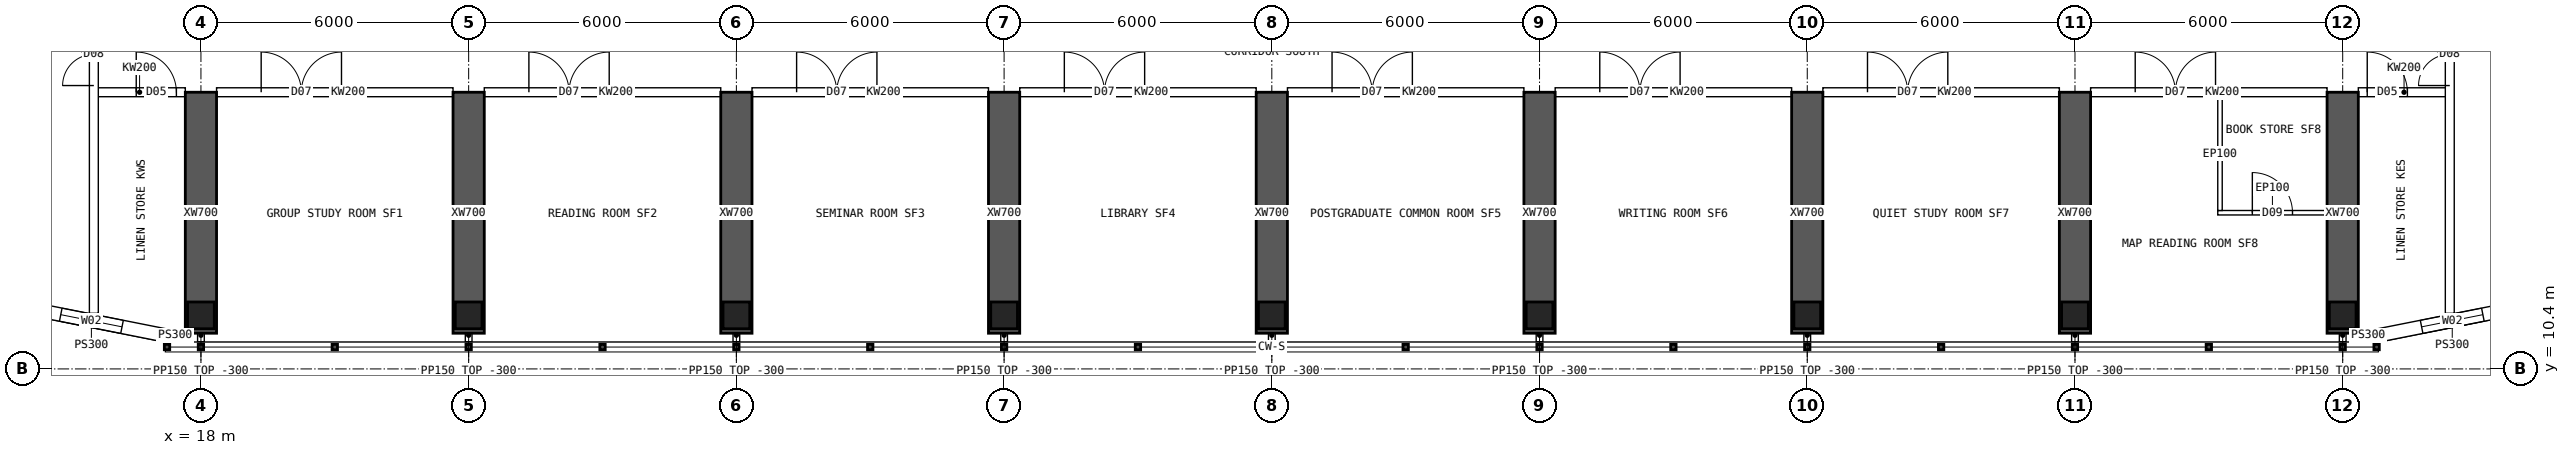
"""IFC4 building model, lengths in metres.
Left out: names, types, materials, properties, quantities, classifications, styles, units other than length and angle.
Written with IfcOpenShell. Run it as: python <this file> out.ifc"""

import sys

from ifc_helpers import new_model, si_unit, direction, frame, frame_2d, origin, origin_2d, place, context, subcontext, project, spatial, polyline, rectangle, hollow_rectangle, outline, extrude, element, fill, save


model = new_model("IFC4")
c1 = context("Model", 3, precision=1e-05, world=origin(), true_north=direction((0.0, 1.0)))
c2 = subcontext(c1, "Body", "Model", "MODEL_VIEW")
j1 = project(units=[si_unit("LENGTHUNIT", "METRE"), si_unit("PLANEANGLEUNIT", "RADIAN")], contexts=[c1])
p1 = place(None, origin())
s1 = spatial("IfcSite", under=j1, at=p1, CompositionType="ELEMENT")
p2 = place(p1, origin())
s2 = spatial("IfcBuilding", under=s1, at=p2, CompositionType="ELEMENT")
p3 = place(p2, frame((0.0, 0.0, 257.8)))
s3 = spatial("IfcBuildingStorey", under=s2, at=p3, CompositionType="ELEMENT", Elevation=257.8)
for number, where, z_axis, x_axis in (
    (1, (18.0, 11.6, 0.0), (0.0, 0.0, 1.0), (1.0, 0.0, 0.0)),
    (2, (24.0, 11.6, 0.0), (0.0, 0.0, 1.0), (1.0, 0.0, 0.0)),
    (3, (30.0, 11.6, 0.0), (0.0, 0.0, 1.0), (1.0, 0.0, 0.0)),
    (4, (36.0, 11.6, 0.0), (0.0, 0.0, 1.0), (1.0, 0.0, 0.0)),
    (5, (42.0, 11.6, 0.0), (0.0, 0.0, 1.0), (1.0, 0.0, 0.0)),
    (6, (48.0, 11.6, 0.0), (0.0, 0.0, 1.0), (1.0, 0.0, 0.0)),
    (7, (54.0, 11.6, 0.0), (0.0, 0.0, 1.0), (1.0, 0.0, 0.0)),
    (8, (60.0, 11.6, 0.0), (0.0, 0.0, 1.0), (1.0, 0.0, 0.0)),
    (9, (66.0, 11.6, 0.0), (0.0, 0.0, 1.0), (1.0, 0.0, 0.0)),
):
    element("IfcColumn", number, at=place(p3, frame(where, z_axis=z_axis, x_axis=x_axis)), inside=s3, PredefinedType="COLUMN", context=c2, shape_type="SweptSolid", body=[
        extrude(hollow_rectangle(XDim=0.6, YDim=0.6, WallThickness=0.06, at=origin_2d()), origin(), (0.0, 0.0, 1.0), 4.5),
    ])
for number, where, z_axis, x_axis in (
    (10, (18.0, 11.2, 0.0), (0.0, 0.0, 1.0), (0.0, 1.0, 0.0)),
    (11, (24.0, 11.2, 0.0), (0.0, 0.0, 1.0), (0.0, 1.0, 0.0)),
    (12, (30.0, 11.2, 0.0), (0.0, 0.0, 1.0), (0.0, 1.0, 0.0)),
    (13, (36.0, 11.2, 0.0), (0.0, 0.0, 1.0), (0.0, 1.0, 0.0)),
    (14, (42.0, 11.2, 0.0), (0.0, 0.0, 1.0), (0.0, 1.0, 0.0)),
    (15, (48.0, 11.2, 0.0), (0.0, 0.0, 1.0), (0.0, 1.0, 0.0)),
    (16, (54.0, 11.2, 0.0), (0.0, 0.0, 1.0), (0.0, 1.0, 0.0)),
    (17, (60.0, 11.2, 0.0), (0.0, 0.0, 1.0), (0.0, 1.0, 0.0)),
    (18, (66.0, 11.2, 0.0), (0.0, 0.0, 1.0), (0.0, 1.0, 0.0)),
):
    element("IfcWall", number, at=place(p3, frame(where, z_axis=z_axis, x_axis=x_axis)), inside=s3, PredefinedType="SHEAR", context=c2, shape_type="SweptSolid", body=[
        extrude(rectangle(XDim=5.4, YDim=0.7, at=frame_2d((2.7, 0.0))), origin(), (0.0, 0.0, 1.0), 4.5),
    ])
p4 = place(p3, frame((66.8, 11.15, 0.0), z_axis=(0.0, 0.0, 1.0), x_axis=(0.98078325777, 0.195100490205, 0.0)))
e19 = element("IfcWall", 19, at=p4, inside=s3, PredefinedType="SOLIDWALL", context=c2, shape_type="SweptSolid", body=[
    extrude(outline(polyline([(-0.03, -0.15), (3.405, -0.15), (3.345, 0.15), (0.03, 0.15), (-0.03, -0.15)])), origin(), (0.0, 0.0, 1.0), 4.2),
])
p5 = place(p4, frame((0.988, 0.0, 0.9)))
e20 = element("IfcOpeningElement", 20, at=p5, cuts=e19, PredefinedType="OPENING", context=c2, shape_type="SweptSolid", body=[
    extrude(rectangle(XDim=1.4, YDim=1.8, at=frame_2d((0.7, 0.9))), frame((0.0, 0.16, 0.0), z_axis=(0.0, -1.0, 0.0), x_axis=(1.0, 0.0, 0.0)), (0.0, 0.0, 1.0), 0.32),
])
p6 = place(p3, frame((13.89, 11.808, 0.0), z_axis=(0.0, 0.0, 1.0), x_axis=(0.98078325777, -0.195100490205, 0.0)))
e21 = element("IfcWall", 21, at=p6, inside=s3, PredefinedType="SOLIDWALL", context=c2, shape_type="SweptSolid", body=[
    extrude(outline(polyline([(-0.03, -0.15), (3.405, -0.15), (3.345, 0.15), (0.03, 0.15), (-0.03, -0.15)])), origin(), (0.0, 0.0, 1.0), 4.2),
])
p7 = place(p6, frame((0.988, 0.0, 0.9)))
e22 = element("IfcOpeningElement", 22, at=p7, cuts=e21, PredefinedType="OPENING", context=c2, shape_type="SweptSolid", body=[
    extrude(rectangle(XDim=1.4, YDim=1.8, at=frame_2d((0.7, 0.9))), frame((0.0, 0.16, 0.0), z_axis=(0.0, -1.0, 0.0), x_axis=(1.0, 0.0, 0.0)), (0.0, 0.0, 1.0), 0.32),
])
for number, where, z_axis, x_axis in (
    (23, (66.8, 11.15, 0.0), (0.0, 0.0, 1.0), (-1.0, 0.0, 0.0)),
    (24, (17.2, 11.15, 0.0), (0.0, 0.0, 1.0), (1.0, 0.0, 0.0)),
):
    element("IfcWall", number, at=place(p3, frame(where, z_axis=z_axis, x_axis=x_axis)), inside=s3, PredefinedType="SOLIDWALL", context=c2, shape_type="SweptSolid", body=[
        extrude(rectangle(XDim=0.45, YDim=0.3, at=frame_2d((0.225, 0.0))), origin(), (0.0, 0.0, 1.0), 4.2),
    ])
p8 = place(p3, frame((15.6, 16.6, 0.0), z_axis=(0.0, 0.0, 1.0), x_axis=(1.0, 0.0, 0.0)))
e25 = element("IfcWall", 25, at=p8, inside=s3, PredefinedType="SOLIDWALL", context=c2, shape_type="SweptSolid", body=[
    extrude(rectangle(XDim=2.05, YDim=0.2, at=frame_2d((1.025, 0.0))), origin(), (0.0, 0.0, 1.0), 4.2),
])
p9 = place(p8, frame((0.95, 0.0, 0.0)))
e26 = element("IfcOpeningElement", 26, at=p9, cuts=e25, PredefinedType="OPENING", context=c2, shape_type="SweptSolid", body=[
    extrude(rectangle(XDim=0.9, YDim=2.1, at=frame_2d((0.45, 1.05))), frame((0.0, 0.11, 0.0), z_axis=(0.0, -1.0, 0.0), x_axis=(1.0, 0.0, 0.0)), (0.0, 0.0, 1.0), 0.22),
])
p10 = place(p3, frame((18.35, 16.6, 0.0), z_axis=(0.0, 0.0, 1.0), x_axis=(1.0, 0.0, 0.0)))
e27 = element("IfcWall", 27, at=p10, inside=s3, PredefinedType="SOLIDWALL", context=c2, shape_type="SweptSolid", body=[
    extrude(rectangle(XDim=5.3, YDim=0.2, at=frame_2d((2.65, 0.0))), origin(), (0.0, 0.0, 1.0), 4.2),
])
p11 = place(p10, frame((1.0, 0.0, 0.0)))
e28 = element("IfcOpeningElement", 28, at=p11, cuts=e27, PredefinedType="OPENING", context=c2, shape_type="SweptSolid", body=[
    extrude(rectangle(XDim=1.8, YDim=2.1, at=frame_2d((0.9, 1.05))), frame((0.0, 0.11, 0.0), z_axis=(0.0, -1.0, 0.0), x_axis=(1.0, 0.0, 0.0)), (0.0, 0.0, 1.0), 0.22),
])
p12 = place(p3, frame((24.35, 16.6, 0.0), z_axis=(0.0, 0.0, 1.0), x_axis=(1.0, 0.0, 0.0)))
e29 = element("IfcWall", 29, at=p12, inside=s3, PredefinedType="SOLIDWALL", context=c2, shape_type="SweptSolid", body=[
    extrude(rectangle(XDim=5.3, YDim=0.2, at=frame_2d((2.65, 0.0))), origin(), (0.0, 0.0, 1.0), 4.2),
])
p13 = place(p12, frame((1.0, 0.0, 0.0)))
e30 = element("IfcOpeningElement", 30, at=p13, cuts=e29, PredefinedType="OPENING", context=c2, shape_type="SweptSolid", body=[
    extrude(rectangle(XDim=1.8, YDim=2.1, at=frame_2d((0.9, 1.05))), frame((0.0, 0.11, 0.0), z_axis=(0.0, -1.0, 0.0), x_axis=(1.0, 0.0, 0.0)), (0.0, 0.0, 1.0), 0.22),
])
p14 = place(p3, frame((30.35, 16.6, 0.0), z_axis=(0.0, 0.0, 1.0), x_axis=(1.0, 0.0, 0.0)))
e31 = element("IfcWall", 31, at=p14, inside=s3, PredefinedType="SOLIDWALL", context=c2, shape_type="SweptSolid", body=[
    extrude(rectangle(XDim=5.3, YDim=0.2, at=frame_2d((2.65, 0.0))), origin(), (0.0, 0.0, 1.0), 4.2),
])
p15 = place(p14, frame((1.0, 0.0, 0.0)))
e32 = element("IfcOpeningElement", 32, at=p15, cuts=e31, PredefinedType="OPENING", context=c2, shape_type="SweptSolid", body=[
    extrude(rectangle(XDim=1.8, YDim=2.1, at=frame_2d((0.9, 1.05))), frame((0.0, 0.11, 0.0), z_axis=(0.0, -1.0, 0.0), x_axis=(1.0, 0.0, 0.0)), (0.0, 0.0, 1.0), 0.22),
])
p16 = place(p3, frame((36.35, 16.6, 0.0), z_axis=(0.0, 0.0, 1.0), x_axis=(1.0, 0.0, 0.0)))
e33 = element("IfcWall", 33, at=p16, inside=s3, PredefinedType="SOLIDWALL", context=c2, shape_type="SweptSolid", body=[
    extrude(rectangle(XDim=5.3, YDim=0.2, at=frame_2d((2.65, 0.0))), origin(), (0.0, 0.0, 1.0), 4.2),
])
p17 = place(p16, frame((1.0, 0.0, 0.0)))
e34 = element("IfcOpeningElement", 34, at=p17, cuts=e33, PredefinedType="OPENING", context=c2, shape_type="SweptSolid", body=[
    extrude(rectangle(XDim=1.8, YDim=2.1, at=frame_2d((0.9, 1.05))), frame((0.0, 0.11, 0.0), z_axis=(0.0, -1.0, 0.0), x_axis=(1.0, 0.0, 0.0)), (0.0, 0.0, 1.0), 0.22),
])
p18 = place(p3, frame((42.35, 16.6, 0.0), z_axis=(0.0, 0.0, 1.0), x_axis=(1.0, 0.0, 0.0)))
e35 = element("IfcWall", 35, at=p18, inside=s3, PredefinedType="SOLIDWALL", context=c2, shape_type="SweptSolid", body=[
    extrude(rectangle(XDim=5.3, YDim=0.2, at=frame_2d((2.65, 0.0))), origin(), (0.0, 0.0, 1.0), 4.2),
])
p19 = place(p18, frame((1.0, 0.0, 0.0)))
e36 = element("IfcOpeningElement", 36, at=p19, cuts=e35, PredefinedType="OPENING", context=c2, shape_type="SweptSolid", body=[
    extrude(rectangle(XDim=1.8, YDim=2.1, at=frame_2d((0.9, 1.05))), frame((0.0, 0.11, 0.0), z_axis=(0.0, -1.0, 0.0), x_axis=(1.0, 0.0, 0.0)), (0.0, 0.0, 1.0), 0.22),
])
p20 = place(p3, frame((48.35, 16.6, 0.0), z_axis=(0.0, 0.0, 1.0), x_axis=(1.0, 0.0, 0.0)))
e37 = element("IfcWall", 37, at=p20, inside=s3, PredefinedType="SOLIDWALL", context=c2, shape_type="SweptSolid", body=[
    extrude(rectangle(XDim=5.3, YDim=0.2, at=frame_2d((2.65, 0.0))), origin(), (0.0, 0.0, 1.0), 4.2),
])
p21 = place(p20, frame((1.0, 0.0, 0.0)))
e38 = element("IfcOpeningElement", 38, at=p21, cuts=e37, PredefinedType="OPENING", context=c2, shape_type="SweptSolid", body=[
    extrude(rectangle(XDim=1.8, YDim=2.1, at=frame_2d((0.9, 1.05))), frame((0.0, 0.11, 0.0), z_axis=(0.0, -1.0, 0.0), x_axis=(1.0, 0.0, 0.0)), (0.0, 0.0, 1.0), 0.22),
])
p22 = place(p3, frame((54.35, 16.6, 0.0), z_axis=(0.0, 0.0, 1.0), x_axis=(1.0, 0.0, 0.0)))
e39 = element("IfcWall", 39, at=p22, inside=s3, PredefinedType="SOLIDWALL", context=c2, shape_type="SweptSolid", body=[
    extrude(rectangle(XDim=5.3, YDim=0.2, at=frame_2d((2.65, 0.0))), origin(), (0.0, 0.0, 1.0), 4.2),
])
p23 = place(p22, frame((1.0, 0.0, 0.0)))
e40 = element("IfcOpeningElement", 40, at=p23, cuts=e39, PredefinedType="OPENING", context=c2, shape_type="SweptSolid", body=[
    extrude(rectangle(XDim=1.8, YDim=2.1, at=frame_2d((0.9, 1.05))), frame((0.0, 0.11, 0.0), z_axis=(0.0, -1.0, 0.0), x_axis=(1.0, 0.0, 0.0)), (0.0, 0.0, 1.0), 0.22),
])
p24 = place(p3, frame((60.35, 16.6, 0.0), z_axis=(0.0, 0.0, 1.0), x_axis=(1.0, 0.0, 0.0)))
e41 = element("IfcWall", 41, at=p24, inside=s3, PredefinedType="SOLIDWALL", context=c2, shape_type="SweptSolid", body=[
    extrude(rectangle(XDim=5.3, YDim=0.2, at=frame_2d((2.65, 0.0))), origin(), (0.0, 0.0, 1.0), 4.2),
])
p25 = place(p24, frame((1.0, 0.0, 0.0)))
e42 = element("IfcOpeningElement", 42, at=p25, cuts=e41, PredefinedType="OPENING", context=c2, shape_type="SweptSolid", body=[
    extrude(rectangle(XDim=1.8, YDim=2.1, at=frame_2d((0.9, 1.05))), frame((0.0, 0.11, 0.0), z_axis=(0.0, -1.0, 0.0), x_axis=(1.0, 0.0, 0.0)), (0.0, 0.0, 1.0), 0.22),
])
p26 = place(p3, frame((66.35, 16.6, 0.0), z_axis=(0.0, 0.0, 1.0), x_axis=(1.0, 0.0, 0.0)))
e43 = element("IfcWall", 43, at=p26, inside=s3, PredefinedType="SOLIDWALL", context=c2, shape_type="SweptSolid", body=[
    extrude(rectangle(XDim=2.05, YDim=0.2, at=frame_2d((1.025, 0.0))), origin(), (0.0, 0.0, 1.0), 4.2),
])
p27 = place(p26, frame((0.2, 0.0, 0.0)))
e44 = element("IfcOpeningElement", 44, at=p27, cuts=e43, PredefinedType="OPENING", context=c2, shape_type="SweptSolid", body=[
    extrude(rectangle(XDim=0.9, YDim=2.1, at=frame_2d((0.45, 1.05))), frame((0.0, 0.11, 0.0), z_axis=(0.0, -1.0, 0.0), x_axis=(1.0, 0.0, 0.0)), (0.0, 0.0, 1.0), 0.22),
])
p28 = place(p3, frame((65.65, 13.9, 0.0), z_axis=(0.0, 0.0, 1.0), x_axis=(-1.0, 0.0, 0.0)))
e45 = element("IfcWall", 45, at=p28, inside=s3, PredefinedType="PARTITIONING", context=c2, shape_type="SweptSolid", body=[
    extrude(rectangle(XDim=2.45, YDim=0.1, at=frame_2d((1.225, 0.0))), origin(), (0.0, 0.0, 1.0), 4.2),
])
p29 = place(p28, frame((0.775, 0.0, 0.0)))
e46 = element("IfcOpeningElement", 46, at=p29, cuts=e45, PredefinedType="OPENING", context=c2, shape_type="SweptSolid", body=[
    extrude(rectangle(XDim=0.9, YDim=2.1, at=frame_2d((0.45, 1.05))), frame((0.0, 0.06, 0.0), z_axis=(0.0, -1.0, 0.0), x_axis=(1.0, 0.0, 0.0)), (0.0, 0.0, 1.0), 0.12),
])
p30 = place(p3, frame((63.25, 13.95, 0.0), z_axis=(0.0, 0.0, 1.0), x_axis=(0.0, 1.0, 0.0)))
e47 = element("IfcWall", 47, at=p30, inside=s3, PredefinedType="PARTITIONING", context=c2, shape_type="SweptSolid", body=[
    extrude(rectangle(XDim=2.55, YDim=0.1, at=frame_2d((1.275, 0.0))), origin(), (0.0, 0.0, 1.0), 4.2),
])
p31 = place(p3, frame((15.6, 11.646, 0.0), z_axis=(0.0, 0.0, 1.0), x_axis=(0.0, 1.0, 0.0)))
e48 = element("IfcWall", 48, at=p31, inside=s3, PredefinedType="SOLIDWALL", context=c2, shape_type="SweptSolid", body=[
    extrude(rectangle(XDim=40.708, YDim=0.2, at=frame_2d((20.354, 0.0))), origin(), (0.0, 0.0, 1.0), 4.2),
])
p32 = place(p31, frame((5.104, 0.0, 0.0)))
e49 = element("IfcOpeningElement", 49, at=p32, cuts=e48, PredefinedType="OPENING", context=c2, shape_type="SweptSolid", body=[
    extrude(rectangle(XDim=1.4, YDim=2.1, at=frame_2d((0.7, 1.05))), frame((0.0, 0.11, 0.0), z_axis=(0.0, -1.0, 0.0), x_axis=(1.0, 0.0, 0.0)), (0.0, 0.0, 1.0), 0.22),
])
p33 = place(p31, frame((34.104, 0.0, 0.0)))
e50 = element("IfcOpeningElement", 50, at=p33, cuts=e48, PredefinedType="OPENING", context=c2, shape_type="SweptSolid", body=[
    extrude(rectangle(XDim=1.4, YDim=2.1, at=frame_2d((0.7, 1.05))), frame((0.0, 0.11, 0.0), z_axis=(0.0, -1.0, 0.0), x_axis=(1.0, 0.0, 0.0)), (0.0, 0.0, 1.0), 0.22),
])
p34 = place(p3, frame((68.4, 11.646, 0.0), z_axis=(0.0, 0.0, 1.0), x_axis=(0.0, 1.0, 0.0)))
e51 = element("IfcWall", 51, at=p34, inside=s3, PredefinedType="SOLIDWALL", context=c2, shape_type="SweptSolid", body=[
    extrude(rectangle(XDim=40.708, YDim=0.2, at=frame_2d((20.354, 0.0))), origin(), (0.0, 0.0, 1.0), 4.2),
])
p35 = place(p34, frame((5.104, 0.0, 0.0)))
e52 = element("IfcOpeningElement", 52, at=p35, cuts=e51, PredefinedType="OPENING", context=c2, shape_type="SweptSolid", body=[
    extrude(rectangle(XDim=1.4, YDim=2.1, at=frame_2d((0.7, 1.05))), frame((0.0, 0.11, 0.0), z_axis=(0.0, -1.0, 0.0), x_axis=(1.0, 0.0, 0.0)), (0.0, 0.0, 1.0), 0.22),
])
p36 = place(p34, frame((34.104, 0.0, 0.0)))
e53 = element("IfcOpeningElement", 53, at=p36, cuts=e51, PredefinedType="OPENING", context=c2, shape_type="SweptSolid", body=[
    extrude(rectangle(XDim=1.4, YDim=2.1, at=frame_2d((0.7, 1.05))), frame((0.0, 0.11, 0.0), z_axis=(0.0, -1.0, 0.0), x_axis=(1.0, 0.0, 0.0)), (0.0, 0.0, 1.0), 0.22),
])
for number, where, z_axis, x_axis in (
    (54, (18.0, 11.3, 0.0), (0.0, 0.0, 1.0), (0.0, -1.0, 0.0)),
    (55, (24.0, 11.3, 0.0), (0.0, 0.0, 1.0), (0.0, -1.0, 0.0)),
    (56, (30.0, 11.3, 0.0), (0.0, 0.0, 1.0), (0.0, -1.0, 0.0)),
    (57, (36.0, 11.3, 0.0), (0.0, 0.0, 1.0), (0.0, -1.0, 0.0)),
    (58, (42.0, 11.3, 0.0), (0.0, 0.0, 1.0), (0.0, -1.0, 0.0)),
    (59, (48.0, 11.3, 0.0), (0.0, 0.0, 1.0), (0.0, -1.0, 0.0)),
    (60, (54.0, 11.3, 0.0), (0.0, 0.0, 1.0), (0.0, -1.0, 0.0)),
    (61, (60.0, 11.3, 0.0), (0.0, 0.0, 1.0), (0.0, -1.0, 0.0)),
    (62, (66.0, 11.3, 0.0), (0.0, 0.0, 1.0), (0.0, -1.0, 0.0)),
):
    element("IfcWall", number, at=place(p3, frame(where, z_axis=z_axis, x_axis=x_axis)), inside=s3, PredefinedType="PARTITIONING", context=c2, shape_type="SweptSolid", body=[
        extrude(rectangle(XDim=0.29, YDim=0.15, at=frame_2d((0.145, 0.0))), origin(), (0.0, 0.0, 1.0), 4.2),
    ])
p37 = place(p5, origin())
e63 = element("IfcWindow", 63, at=p37, inside=s3, PartitioningType="SINGLE_PANEL", PredefinedType="WINDOW", context=c2, shape_type="SweptSolid", body=[
    extrude(rectangle(XDim=1.4, YDim=1.8, at=frame_2d((0.7, 0.9))), frame((0.0, 0.03, 0.0), z_axis=(0.0, -1.0, 0.0), x_axis=(1.0, 0.0, 0.0)), (0.0, 0.0, 1.0), 0.06),
])
fill(e20, e63)
p38 = place(p7, origin())
e64 = element("IfcWindow", 64, at=p38, inside=s3, PartitioningType="SINGLE_PANEL", PredefinedType="WINDOW", context=c2, shape_type="SweptSolid", body=[
    extrude(rectangle(XDim=1.4, YDim=1.8, at=frame_2d((0.7, 0.9))), frame((0.0, 0.03, 0.0), z_axis=(0.0, -1.0, 0.0), x_axis=(1.0, 0.0, 0.0)), (0.0, 0.0, 1.0), 0.06),
])
fill(e22, e64)
p39 = place(p11, origin())
e65 = element("IfcDoor", 65, at=p39, inside=s3, OperationType="DOUBLE_DOOR_SINGLE_SWING", PredefinedType="DOOR", context=c2, shape_type="SweptSolid", body=[
    extrude(rectangle(XDim=1.8, YDim=2.1, at=frame_2d((0.9, 1.05))), frame((0.0, 0.025, 0.0), z_axis=(0.0, -1.0, 0.0), x_axis=(1.0, 0.0, 0.0)), (0.0, 0.0, 1.0), 0.05),
])
fill(e28, e65)
p40 = place(p13, origin())
e66 = element("IfcDoor", 66, at=p40, inside=s3, OperationType="DOUBLE_DOOR_SINGLE_SWING", PredefinedType="DOOR", context=c2, shape_type="SweptSolid", body=[
    extrude(rectangle(XDim=1.8, YDim=2.1, at=frame_2d((0.9, 1.05))), frame((0.0, 0.025, 0.0), z_axis=(0.0, -1.0, 0.0), x_axis=(1.0, 0.0, 0.0)), (0.0, 0.0, 1.0), 0.05),
])
fill(e30, e66)
p41 = place(p15, origin())
e67 = element("IfcDoor", 67, at=p41, inside=s3, OperationType="DOUBLE_DOOR_SINGLE_SWING", PredefinedType="DOOR", context=c2, shape_type="SweptSolid", body=[
    extrude(rectangle(XDim=1.8, YDim=2.1, at=frame_2d((0.9, 1.05))), frame((0.0, 0.025, 0.0), z_axis=(0.0, -1.0, 0.0), x_axis=(1.0, 0.0, 0.0)), (0.0, 0.0, 1.0), 0.05),
])
fill(e32, e67)
p42 = place(p17, origin())
e68 = element("IfcDoor", 68, at=p42, inside=s3, OperationType="DOUBLE_DOOR_SINGLE_SWING", PredefinedType="DOOR", context=c2, shape_type="SweptSolid", body=[
    extrude(rectangle(XDim=1.8, YDim=2.1, at=frame_2d((0.9, 1.05))), frame((0.0, 0.025, 0.0), z_axis=(0.0, -1.0, 0.0), x_axis=(1.0, 0.0, 0.0)), (0.0, 0.0, 1.0), 0.05),
])
fill(e34, e68)
p43 = place(p19, origin())
e69 = element("IfcDoor", 69, at=p43, inside=s3, OperationType="DOUBLE_DOOR_SINGLE_SWING", PredefinedType="DOOR", context=c2, shape_type="SweptSolid", body=[
    extrude(rectangle(XDim=1.8, YDim=2.1, at=frame_2d((0.9, 1.05))), frame((0.0, 0.025, 0.0), z_axis=(0.0, -1.0, 0.0), x_axis=(1.0, 0.0, 0.0)), (0.0, 0.0, 1.0), 0.05),
])
fill(e36, e69)
p44 = place(p21, origin())
e70 = element("IfcDoor", 70, at=p44, inside=s3, OperationType="DOUBLE_DOOR_SINGLE_SWING", PredefinedType="DOOR", context=c2, shape_type="SweptSolid", body=[
    extrude(rectangle(XDim=1.8, YDim=2.1, at=frame_2d((0.9, 1.05))), frame((0.0, 0.025, 0.0), z_axis=(0.0, -1.0, 0.0), x_axis=(1.0, 0.0, 0.0)), (0.0, 0.0, 1.0), 0.05),
])
fill(e38, e70)
p45 = place(p23, origin())
e71 = element("IfcDoor", 71, at=p45, inside=s3, OperationType="DOUBLE_DOOR_SINGLE_SWING", PredefinedType="DOOR", context=c2, shape_type="SweptSolid", body=[
    extrude(rectangle(XDim=1.8, YDim=2.1, at=frame_2d((0.9, 1.05))), frame((0.0, 0.025, 0.0), z_axis=(0.0, -1.0, 0.0), x_axis=(1.0, 0.0, 0.0)), (0.0, 0.0, 1.0), 0.05),
])
fill(e40, e71)
p46 = place(p29, origin())
e72 = element("IfcDoor", 72, at=p46, inside=s3, OperationType="SINGLE_SWING_RIGHT", PredefinedType="DOOR", context=c2, shape_type="SweptSolid", body=[
    extrude(rectangle(XDim=0.9, YDim=2.1, at=frame_2d((0.45, 1.05))), frame((0.0, 0.025, 0.0), z_axis=(0.0, -1.0, 0.0), x_axis=(1.0, 0.0, 0.0)), (0.0, 0.0, 1.0), 0.05),
])
fill(e46, e72)
p47 = place(p25, origin())
e73 = element("IfcDoor", 73, at=p47, inside=s3, OperationType="DOUBLE_DOOR_SINGLE_SWING", PredefinedType="DOOR", context=c2, shape_type="SweptSolid", body=[
    extrude(rectangle(XDim=1.8, YDim=2.1, at=frame_2d((0.9, 1.05))), frame((0.0, 0.025, 0.0), z_axis=(0.0, -1.0, 0.0), x_axis=(1.0, 0.0, 0.0)), (0.0, 0.0, 1.0), 0.05),
])
fill(e42, e73)
p48 = place(p32, origin())
e74 = element("IfcDoor", 74, at=p48, inside=s3, OperationType="DOUBLE_DOOR_SINGLE_SWING", PredefinedType="DOOR", context=c2, shape_type="SweptSolid", body=[
    extrude(rectangle(XDim=1.4, YDim=2.1, at=frame_2d((0.7, 1.05))), frame((0.0, 0.025, 0.0), z_axis=(0.0, -1.0, 0.0), x_axis=(1.0, 0.0, 0.0)), (0.0, 0.0, 1.0), 0.05),
])
fill(e49, e74)
p49 = place(p9, origin())
e75 = element("IfcDoor", 75, at=p49, inside=s3, OperationType="SINGLE_SWING_LEFT", PredefinedType="DOOR", context=c2, shape_type="SweptSolid", body=[
    extrude(rectangle(XDim=0.9, YDim=2.1, at=frame_2d((0.45, 1.05))), frame((0.0, 0.025, 0.0), z_axis=(0.0, -1.0, 0.0), x_axis=(1.0, 0.0, 0.0)), (0.0, 0.0, 1.0), 0.05),
])
fill(e26, e75)
p50 = place(p35, origin())
e76 = element("IfcDoor", 76, at=p50, inside=s3, OperationType="DOUBLE_DOOR_SINGLE_SWING", PredefinedType="DOOR", context=c2, shape_type="SweptSolid", body=[
    extrude(rectangle(XDim=1.4, YDim=2.1, at=frame_2d((0.7, 1.05))), frame((0.0, 0.025, 0.0), z_axis=(0.0, -1.0, 0.0), x_axis=(1.0, 0.0, 0.0)), (0.0, 0.0, 1.0), 0.05),
])
fill(e52, e76)
p51 = place(p27, origin())
e77 = element("IfcDoor", 77, at=p51, inside=s3, OperationType="SINGLE_SWING_LEFT", PredefinedType="DOOR", context=c2, shape_type="SweptSolid", body=[
    extrude(rectangle(XDim=0.9, YDim=2.1, at=frame_2d((0.45, 1.05))), frame((0.0, 0.025, 0.0), z_axis=(0.0, -1.0, 0.0), x_axis=(1.0, 0.0, 0.0)), (0.0, 0.0, 1.0), 0.05),
])
fill(e44, e77)
save(model, sys.argv[1])
